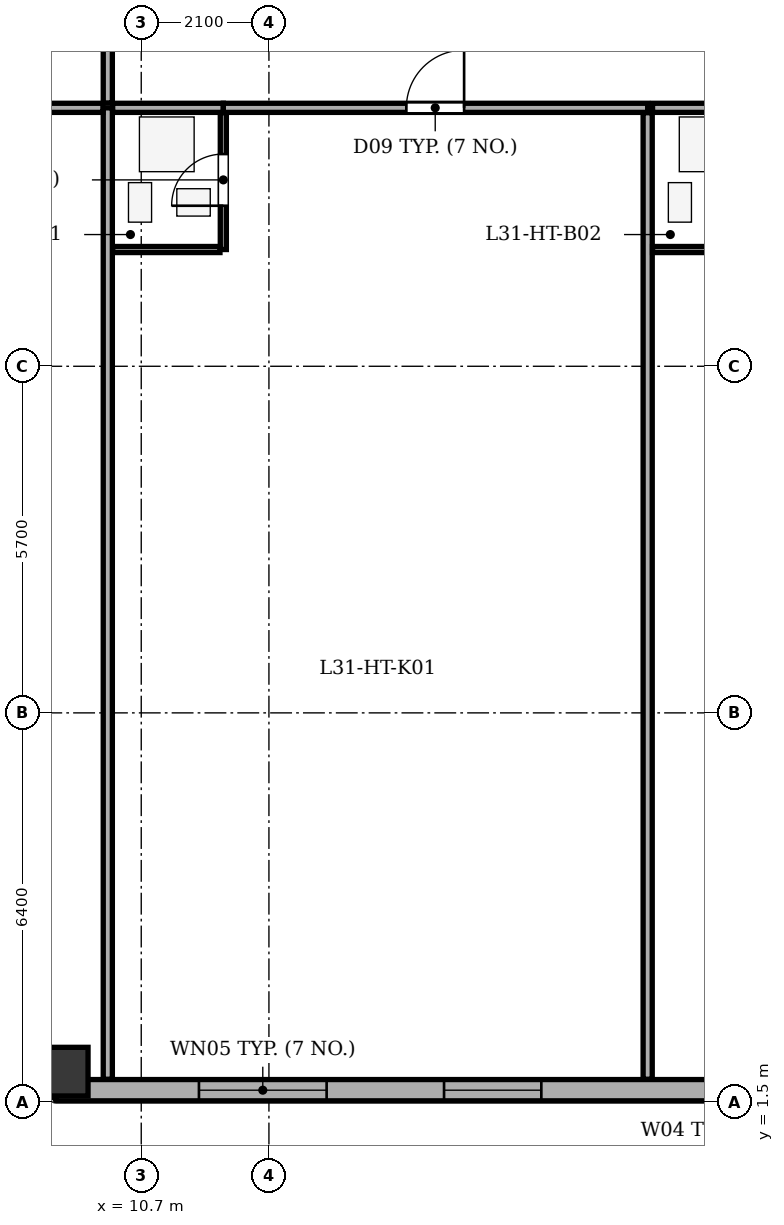
"""IFC4 building model, lengths in metres.
Left out: names, types, materials, properties, quantities, classifications, styles, units other than length and angle.
Written with IfcOpenShell. Run it as: python <this file> out.ifc"""

import sys

from ifc_helpers import new_model, si_unit, direction, frame, frame_2d, origin, origin_2d, place, context, subcontext, project, spatial, rectangle, extrude, element, fill, save


model = new_model("IFC4")
c1 = context("Model", 3, precision=1e-05, world=origin(), true_north=direction((0.0, 1.0)))
c2 = subcontext(c1, "Body", "Model", "MODEL_VIEW")
j1 = project(units=[si_unit("LENGTHUNIT", "METRE"), si_unit("PLANEANGLEUNIT", "RADIAN")], contexts=[c1])
p1 = place(None, origin())
s1 = spatial("IfcSite", under=j1, at=p1, CompositionType="ELEMENT")
p2 = place(p1, origin())
s2 = spatial("IfcBuilding", under=s1, at=p2, CompositionType="ELEMENT")
p3 = place(p2, frame((0.0, 0.0, 127.3)))
s3 = spatial("IfcBuildingStorey", under=s2, at=p3, CompositionType="ELEMENT", Elevation=127.3)
p4 = place(p3, frame((9.3, 2.0, 0.0), z_axis=(0.0, 0.0, 1.0), x_axis=(1.0, 0.0, 0.0)))
e1 = element("IfcColumn", 1, at=p4, inside=s3, PredefinedType="COLUMN", context=c2, shape_type="SweptSolid", body=[
    extrude(rectangle(XDim=0.8, YDim=1.05, at=origin_2d()), origin(), (0.0, 0.0, 1.0), 3.5),
])
p5 = place(p3, frame((44.3, 1.695, 0.0), z_axis=(0.0, 0.0, 1.0), x_axis=(-1.0, 0.0, 0.0)))
e2 = element("IfcWall", 2, at=p5, inside=s3, PredefinedType="STANDARD", context=c2, shape_type="SweptSolid", body=[
    extrude(rectangle(XDim=35.0, YDim=0.35, at=frame_2d((17.5, 0.0))), origin(), (0.0, 0.0, 1.0), 2.785),
])
p6 = place(p5, frame((19.6, 0.0, 0.0)))
e3 = element("IfcOpeningElement", 3, at=p6, cuts=e2, PredefinedType="OPENING", context=c2, shape_type="SweptSolid", body=[
    extrude(rectangle(XDim=1.0, YDim=2.02, at=frame_2d((0.5, 1.01))), frame((0.0, 0.185, 0.0), z_axis=(0.0, -1.0, 0.0), x_axis=(1.0, 0.0, 0.0)), (0.0, 0.0, 1.0), 0.37),
])
p7 = place(p5, frame((1.508, 0.0, 0.75)))
e4 = element("IfcOpeningElement", 4, at=p7, cuts=e2, PredefinedType="OPENING", context=c2, shape_type="SweptSolid", body=[
    extrude(rectangle(XDim=1.6, YDim=1.75, at=frame_2d((0.8, 0.875))), frame((0.0, 0.185, 0.0), z_axis=(0.0, -1.0, 0.0), x_axis=(1.0, 0.0, 0.0)), (0.0, 0.0, 1.0), 0.37),
])
p8 = place(p5, frame((4.338, 0.0, 0.75)))
e5 = element("IfcOpeningElement", 5, at=p8, cuts=e2, PredefinedType="OPENING", context=c2, shape_type="SweptSolid", body=[
    extrude(rectangle(XDim=1.6, YDim=1.75, at=frame_2d((0.8, 0.875))), frame((0.0, 0.185, 0.0), z_axis=(0.0, -1.0, 0.0), x_axis=(1.0, 0.0, 0.0)), (0.0, 0.0, 1.0), 0.37),
])
p9 = place(p5, frame((10.406, 0.0, 0.75)))
e6 = element("IfcOpeningElement", 6, at=p9, cuts=e2, PredefinedType="OPENING", context=c2, shape_type="SweptSolid", body=[
    extrude(rectangle(XDim=1.6, YDim=1.75, at=frame_2d((0.8, 0.875))), frame((0.0, 0.185, 0.0), z_axis=(0.0, -1.0, 0.0), x_axis=(1.0, 0.0, 0.0)), (0.0, 0.0, 1.0), 0.37),
])
p10 = place(p5, frame((13.003, 0.0, 0.75)))
e7 = element("IfcOpeningElement", 7, at=p10, cuts=e2, PredefinedType="OPENING", context=c2, shape_type="SweptSolid", body=[
    extrude(rectangle(XDim=1.6, YDim=1.75, at=frame_2d((0.8, 0.875))), frame((0.0, 0.185, 0.0), z_axis=(0.0, -1.0, 0.0), x_axis=(1.0, 0.0, 0.0)), (0.0, 0.0, 1.0), 0.37),
])
p11 = place(p5, frame((27.02, 0.0, 0.75)))
e8 = element("IfcOpeningElement", 8, at=p11, cuts=e2, PredefinedType="OPENING", context=c2, shape_type="SweptSolid", body=[
    extrude(rectangle(XDim=1.6, YDim=1.75, at=frame_2d((0.8, 0.875))), frame((0.0, 0.185, 0.0), z_axis=(0.0, -1.0, 0.0), x_axis=(1.0, 0.0, 0.0)), (0.0, 0.0, 1.0), 0.37),
])
p12 = place(p5, frame((30.551, 0.0, 0.75)))
e9 = element("IfcOpeningElement", 9, at=p12, cuts=e2, PredefinedType="OPENING", context=c2, shape_type="SweptSolid", body=[
    extrude(rectangle(XDim=2.1, YDim=1.75, at=frame_2d((1.05, 0.875))), frame((0.0, 0.185, 0.0), z_axis=(0.0, -1.0, 0.0), x_axis=(1.0, 0.0, 0.0)), (0.0, 0.0, 1.0), 0.37),
])
p13 = place(p3, frame((9.3, 1.695, 0.0), z_axis=(0.0, 0.0, 1.0), x_axis=(-0.707106781187, 0.707106781187, 0.0)))
e10 = element("IfcWall", 10, at=p13, inside=s3, PredefinedType="STANDARD", context=c2, shape_type="SweptSolid", body=[
    extrude(rectangle(XDim=6.795, YDim=0.35, at=frame_2d((3.397, 0.0))), origin(), (0.0, 0.0, 1.0), 2.785),
])
p14 = place(p13, frame((2.698, 0.0, 0.75)))
e11 = element("IfcOpeningElement", 11, at=p14, cuts=e10, PredefinedType="OPENING", context=c2, shape_type="SweptSolid", body=[
    extrude(rectangle(XDim=1.4, YDim=1.65, at=frame_2d((0.7, 0.825))), frame((0.0, 0.185, 0.0), z_axis=(0.0, -1.0, 0.0), x_axis=(1.0, 0.0, 0.0)), (0.0, 0.0, 1.0), 0.37),
])
p15 = place(p3, frame((10.15, 1.875, 0.0), z_axis=(0.0, 0.0, 1.0), x_axis=(0.0, 1.0, 0.0)))
e12 = element("IfcWall", 12, at=p15, inside=s3, PredefinedType="PARTITIONING", context=c2, shape_type="SweptSolid", body=[
    extrude(rectangle(XDim=15.975, YDim=0.15, at=frame_2d((7.988, 0.0))), origin(), (0.0, 0.0, 1.0), 3.2),
])
p16 = place(p3, frame((10.23, 17.85, 0.0), z_axis=(0.0, 0.0, 1.0), x_axis=(1.0, 0.0, 0.0)))
e13 = element("IfcWall", 13, at=p16, inside=s3, PredefinedType="PARTITIONING", context=c2, shape_type="SweptSolid", body=[
    extrude(rectangle(XDim=1.82, YDim=0.15, at=frame_2d((0.91, 0.0))), origin(), (0.0, 0.0, 1.0), 3.2),
])
p17 = place(p3, frame((12.05, 17.85, 0.0), z_axis=(0.0, 0.0, 1.0), x_axis=(1.0, 0.0, 0.0)))
e14 = element("IfcWall", 14, at=p17, inside=s3, PredefinedType="PARTITIONING", context=c2, shape_type="SweptSolid", body=[
    extrude(rectangle(XDim=6.979, YDim=0.15, at=frame_2d((3.49, 0.0))), origin(), (0.0, 0.0, 1.0), 3.2),
])
p18 = place(p17, frame((3.01, 0.0, 0.0)))
e15 = element("IfcOpeningElement", 15, at=p18, cuts=e14, PredefinedType="OPENING", context=c2, shape_type="SweptSolid", body=[
    extrude(rectangle(XDim=0.95, YDim=2.1, at=frame_2d((0.475, 1.05))), frame((0.0, 0.085, 0.0), z_axis=(0.0, -1.0, 0.0), x_axis=(1.0, 0.0, 0.0)), (0.0, 0.0, 1.0), 0.17),
])
p19 = place(p3, frame((12.05, 15.52, 0.0), z_axis=(0.0, 0.0, 1.0), x_axis=(0.0, 1.0, 0.0)))
e16 = element("IfcWall", 16, at=p19, inside=s3, PredefinedType="PARTITIONING", context=c2, shape_type="SweptSolid", body=[
    extrude(rectangle(XDim=2.25, YDim=0.1, at=frame_2d((1.125, 0.0))), origin(), (0.0, 0.0, 1.0), 3.2),
])
p20 = place(p19, frame((0.72, 0.0, 0.0)))
e17 = element("IfcOpeningElement", 17, at=p20, cuts=e16, PredefinedType="OPENING", context=c2, shape_type="SweptSolid", body=[
    extrude(rectangle(XDim=0.85, YDim=2.05, at=frame_2d((0.425, 1.025))), frame((0.0, 0.06, 0.0), z_axis=(0.0, -1.0, 0.0), x_axis=(1.0, 0.0, 0.0)), (0.0, 0.0, 1.0), 0.12),
])
p21 = place(p3, frame((10.23, 15.52, 0.0), z_axis=(0.0, 0.0, 1.0), x_axis=(1.0, 0.0, 0.0)))
e18 = element("IfcWall", 18, at=p21, inside=s3, PredefinedType="PARTITIONING", context=c2, shape_type="SweptSolid", body=[
    extrude(rectangle(XDim=1.765, YDim=0.1, at=frame_2d((0.883, 0.0))), origin(), (0.0, 0.0, 1.0), 3.2),
])
p22 = place(p3, frame((19.029, 1.875, 0.0), z_axis=(0.0, 0.0, 1.0), x_axis=(0.0, 1.0, 0.0)))
e19 = element("IfcWall", 19, at=p22, inside=s3, PredefinedType="PARTITIONING", context=c2, shape_type="SweptSolid", body=[
    extrude(rectangle(XDim=15.895, YDim=0.15, at=frame_2d((7.948, 0.0))), origin(), (0.0, 0.0, 1.0), 3.2),
])
p23 = place(p3, frame((19.109, 17.85, 0.0), z_axis=(0.0, 0.0, 1.0), x_axis=(1.0, 0.0, 0.0)))
e20 = element("IfcWall", 20, at=p23, inside=s3, PredefinedType="PARTITIONING", context=c2, shape_type="SweptSolid", body=[
    extrude(rectangle(XDim=1.82, YDim=0.15, at=frame_2d((0.91, 0.0))), origin(), (0.0, 0.0, 1.0), 3.2),
])
p24 = place(p3, frame((19.109, 15.52, 0.0), z_axis=(0.0, 0.0, 1.0), x_axis=(1.0, 0.0, 0.0)))
e21 = element("IfcWall", 21, at=p24, inside=s3, PredefinedType="PARTITIONING", context=c2, shape_type="SweptSolid", body=[
    extrude(rectangle(XDim=1.765, YDim=0.1, at=frame_2d((0.883, 0.0))), origin(), (0.0, 0.0, 1.0), 3.2),
])
p25 = place(p3, frame((4.675, 17.85, 0.0), z_axis=(0.0, 0.0, 1.0), x_axis=(1.0, 0.0, 0.0)))
e22 = element("IfcWall", 22, at=p25, inside=s3, PredefinedType="PARTITIONING", context=c2, shape_type="SweptSolid", body=[
    extrude(rectangle(XDim=5.395, YDim=0.15, at=frame_2d((2.698, 0.0))), origin(), (0.0, 0.0, 1.0), 3.2),
])
p26 = place(p3, frame((10.15, 17.93, 0.0), z_axis=(0.0, 0.0, 1.0), x_axis=(0.0, 1.0, 0.0)))
e23 = element("IfcWall", 23, at=p26, inside=s3, PredefinedType="PARTITIONING", context=c2, shape_type="SweptSolid", body=[
    extrude(rectangle(XDim=18.54, YDim=0.15, at=frame_2d((9.27, 0.0))), origin(), (0.0, 0.0, 1.0), 3.2),
])
p27 = place(p26, frame((8.79, 0.0, 0.0)))
e24 = element("IfcOpeningElement", 24, at=p27, cuts=e23, PredefinedType="OPENING", context=c2, shape_type="SweptSolid", body=[
    extrude(rectangle(XDim=0.95, YDim=2.1, at=frame_2d((0.475, 1.05))), frame((0.0, 0.085, 0.0), z_axis=(0.0, -1.0, 0.0), x_axis=(1.0, 0.0, 0.0)), (0.0, 0.0, 1.0), 0.17),
])
p28 = place(p11, origin())
e25 = element("IfcWindow", 25, at=p28, inside=s3, PartitioningType="SINGLE_PANEL", PredefinedType="WINDOW", context=c2, shape_type="SweptSolid", body=[
    extrude(rectangle(XDim=1.6, YDim=1.75, at=frame_2d((0.8, 0.875))), frame((0.0, -0.01, 0.0), z_axis=(0.0, -1.0, 0.0), x_axis=(1.0, 0.0, 0.0)), (0.0, 0.0, 1.0), 0.06),
])
fill(e8, e25)
p29 = place(p12, origin())
e26 = element("IfcWindow", 26, at=p29, inside=s3, PartitioningType="SINGLE_PANEL", PredefinedType="WINDOW", context=c2, shape_type="SweptSolid", body=[
    extrude(rectangle(XDim=2.1, YDim=1.75, at=frame_2d((1.05, 0.875))), frame((0.0, -0.01, 0.0), z_axis=(0.0, -1.0, 0.0), x_axis=(1.0, 0.0, 0.0)), (0.0, 0.0, 1.0), 0.06),
])
fill(e9, e26)
p30 = place(p20, origin())
e27 = element("IfcDoor", 27, at=p30, inside=s3, OperationType="SINGLE_SWING_LEFT", PredefinedType="DOOR", context=c2, shape_type="SweptSolid", body=[
    extrude(rectangle(XDim=0.85, YDim=2.05, at=frame_2d((0.425, 1.025))), frame((0.0, 0.025, 0.0), z_axis=(0.0, -1.0, 0.0), x_axis=(1.0, 0.0, 0.0)), (0.0, 0.0, 1.0), 0.05),
])
fill(e17, e27)
p31 = place(p18, origin())
e28 = element("IfcDoor", 28, at=p31, inside=s3, OperationType="SINGLE_SWING_RIGHT", PredefinedType="DOOR", context=c2, shape_type="SweptSolid", body=[
    extrude(rectangle(XDim=0.95, YDim=2.1, at=frame_2d((0.475, 1.05))), frame((0.0, 0.025, 0.0), z_axis=(0.0, -1.0, 0.0), x_axis=(1.0, 0.0, 0.0)), (0.0, 0.0, 1.0), 0.05),
])
fill(e15, e28)
save(model, sys.argv[1])
